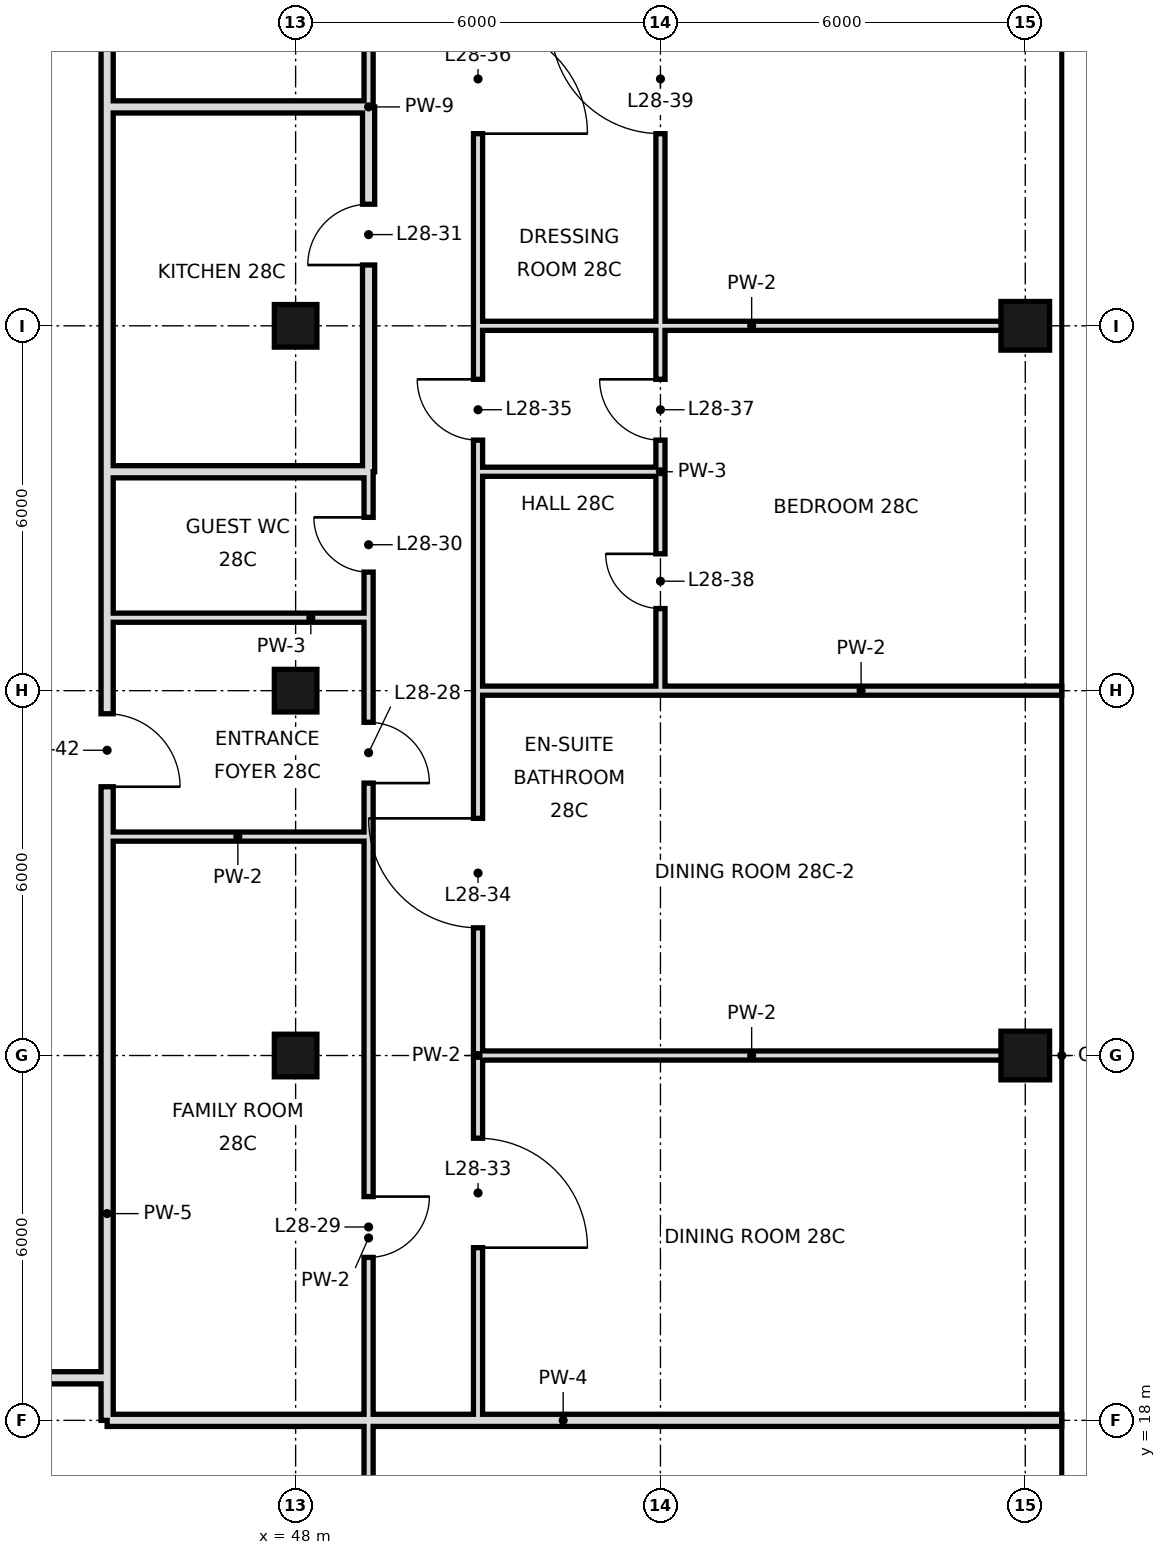
"""IFC4 building model, lengths in metres.
Left out: names, types, materials, properties, quantities, classifications, styles, units other than length and angle.
Written with IfcOpenShell. Run it as: python <this file> out.ifc"""

import sys

from ifc_helpers import new_model, si_unit, direction, frame, frame_2d, origin, origin_2d, place, context, subcontext, project, spatial, rectangle, hollow_rectangle, extrude, element, fill, save


model = new_model("IFC4")
c1 = context("Model", 3, precision=1e-05, world=origin(), true_north=direction((0.0, 1.0)))
c2 = subcontext(c1, "Body", "Model", "MODEL_VIEW")
j1 = project(units=[si_unit("LENGTHUNIT", "METRE"), si_unit("PLANEANGLEUNIT", "RADIAN")], contexts=[c1])
p1 = place(None, origin())
s1 = spatial("IfcSite", under=j1, at=p1, CompositionType="ELEMENT")
p2 = place(p1, origin())
s2 = spatial("IfcBuilding", under=s1, at=p2, CompositionType="ELEMENT")
p3 = place(p2, frame((0.0, 0.0, 126.8)))
s3 = spatial("IfcBuildingStorey", under=s2, at=p3, CompositionType="ELEMENT", Elevation=126.8)
for number, where, z_axis, x_axis in (
    (1, (48.0, 24.0, 0.0), (0.0, 0.0, 1.0), (1.0, 0.0, 0.0)),
    (2, (48.0, 30.0, 0.0), (0.0, 0.0, 1.0), (1.0, 0.0, 0.0)),
    (3, (48.0, 36.0, 0.0), (0.0, 0.0, 1.0), (1.0, 0.0, 0.0)),
):
    element("IfcColumn", number, at=place(p3, frame(where, z_axis=z_axis, x_axis=x_axis)), inside=s3, PredefinedType="COLUMN", context=c2, shape_type="SweptSolid", body=[
        extrude(hollow_rectangle(XDim=0.7, YDim=0.7, WallThickness=0.036, at=origin_2d()), origin(), (0.0, 0.0, 1.0), 3.6),
    ])
for number, where, z_axis, x_axis in (
    (4, (60.0, 24.0, 0.0), (0.0, 0.0, 1.0), (1.0, 0.0, 0.0)),
    (5, (60.0, 36.0, 0.0), (0.0, 0.0, 1.0), (1.0, 0.0, 0.0)),
):
    element("IfcColumn", number, at=place(p3, frame(where, z_axis=z_axis, x_axis=x_axis)), inside=s3, PredefinedType="COLUMN", context=c2, shape_type="SweptSolid", body=[
        extrude(hollow_rectangle(XDim=0.8, YDim=0.8, WallThickness=0.04, at=origin_2d()), origin(), (0.0, 0.0, 1.0), 3.6),
    ])
p4 = place(p3, frame((44.9, 18.7, 0.0), z_axis=(0.0, 0.0, 1.0), x_axis=(0.0, 1.0, 0.0)))
e6 = element("IfcWall", 6, at=p4, inside=s3, PredefinedType="SOLIDWALL", context=c2, shape_type="SweptSolid", body=[
    extrude(rectangle(XDim=14.9, YDim=0.2, at=frame_2d((7.45, 0.0))), origin(), (0.0, 0.0, 1.0), 2.97),
])
p5 = place(p4, frame((9.72, 0.0, 0.0)))
e7 = element("IfcOpeningElement", 7, at=p5, cuts=e6, PredefinedType="OPENING", context=c2, shape_type="SweptSolid", body=[
    extrude(rectangle(XDim=1.2, YDim=2.4, at=frame_2d((0.6, 1.2))), frame((0.0, 0.11, 0.0), z_axis=(0.0, -1.0, 0.0), x_axis=(1.0, 0.0, 0.0)), (0.0, 0.0, 1.0), 0.22),
])
p6 = place(p3, frame((44.9, 39.6, 0.0), z_axis=(0.0, 0.0, 1.0), x_axis=(0.0, 1.0, 0.0)))
e8 = element("IfcWall", 8, at=p6, inside=s3, PredefinedType="SOLIDWALL", context=c2, shape_type="SweptSolid", body=[
    extrude(rectangle(XDim=9.0, YDim=0.2, at=frame_2d((4.5, 0.0))), origin(), (0.0, 0.0, 1.0), 2.72),
])
p7 = place(p3, frame((44.9, 33.6, 0.0), z_axis=(0.0, 0.0, 1.0), x_axis=(0.0, 1.0, 0.0)))
e9 = element("IfcWall", 9, at=p7, inside=s3, PredefinedType="SOLIDWALL", context=c2, shape_type="SweptSolid", body=[
    extrude(rectangle(XDim=6.0, YDim=0.2, at=frame_2d((3.0, 0.0))), origin(), (0.0, 0.0, 1.0), 3.42),
])
p8 = place(p3, frame((44.9, 18.0, 0.0), z_axis=(0.0, 0.0, 1.0), x_axis=(0.0, 1.0, 0.0)))
e10 = element("IfcWall", 10, at=p8, inside=s3, PredefinedType="SOLIDWALL", context=c2, shape_type="SweptSolid", body=[
    extrude(rectangle(XDim=0.7, YDim=0.2, at=frame_2d((0.35, 0.0))), origin(), (0.0, 0.0, 1.0), 2.97),
])
p9 = place(p3, frame((49.2, 33.6, 0.0), z_axis=(0.0, 0.0, 1.0), x_axis=(0.0, 1.0, 0.0)))
e11 = element("IfcWall", 11, at=p9, inside=s3, PredefinedType="SOLIDWALL", context=c2, shape_type="SweptSolid", body=[
    extrude(rectangle(XDim=6.0, YDim=0.2, at=frame_2d((3.0, 0.0))), origin(), (0.0, 0.0, 1.0), 2.72),
])
p10 = place(p9, frame((3.4, 0.0, 0.0)))
e12 = element("IfcOpeningElement", 12, at=p10, cuts=e11, PredefinedType="OPENING", context=c2, shape_type="SweptSolid", body=[
    extrude(rectangle(XDim=1.0, YDim=2.4, at=frame_2d((0.5, 1.2))), frame((0.0, 0.11, 0.0), z_axis=(0.0, -1.0, 0.0), x_axis=(1.0, 0.0, 0.0)), (0.0, 0.0, 1.0), 0.22),
])
p11 = place(p3, frame((49.2, 10.8, 0.0), z_axis=(0.0, 0.0, 1.0), x_axis=(0.0, 1.0, 0.0)))
e13 = element("IfcWall", 13, at=p11, inside=s3, PredefinedType="PARTITIONING", context=c2, shape_type="SweptSolid", body=[
    extrude(rectangle(XDim=20.4, YDim=0.15, at=frame_2d((10.2, 0.0))), origin(), (0.0, 0.0, 1.0), 3.42),
])
p12 = place(p11, frame((17.68, 0.0, 0.0)))
e14 = element("IfcOpeningElement", 14, at=p12, cuts=e13, PredefinedType="OPENING", context=c2, shape_type="SweptSolid", body=[
    extrude(rectangle(XDim=1.0, YDim=2.4, at=frame_2d((0.5, 1.2))), frame((0.0, 0.085, 0.0), z_axis=(0.0, -1.0, 0.0), x_axis=(1.0, 0.0, 0.0)), (0.0, 0.0, 1.0), 0.17),
])
p13 = place(p11, frame((9.88, 0.0, 0.0)))
e15 = element("IfcOpeningElement", 15, at=p13, cuts=e13, PredefinedType="OPENING", context=c2, shape_type="SweptSolid", body=[
    extrude(rectangle(XDim=1.0, YDim=2.4, at=frame_2d((0.5, 1.2))), frame((0.0, 0.085, 0.0), z_axis=(0.0, -1.0, 0.0), x_axis=(1.0, 0.0, 0.0)), (0.0, 0.0, 1.0), 0.17),
])
p14 = place(p3, frame((49.2, 39.6, 0.0), z_axis=(0.0, 0.0, 1.0), x_axis=(0.0, 1.0, 0.0)))
e16 = element("IfcWall", 16, at=p14, inside=s3, PredefinedType="PARTITIONING", context=c2, shape_type="SweptSolid", body=[
    extrude(rectangle(XDim=9.0, YDim=0.15, at=frame_2d((4.5, 0.0))), origin(), (0.0, 0.0, 1.0), 3.42),
])
p15 = place(p14, frame((3.7, 0.0, 0.0)))
e17 = element("IfcOpeningElement", 17, at=p15, cuts=e16, PredefinedType="OPENING", context=c2, shape_type="SweptSolid", body=[
    extrude(rectangle(XDim=1.0, YDim=2.4, at=frame_2d((0.5, 1.2))), frame((0.0, 0.085, 0.0), z_axis=(0.0, -1.0, 0.0), x_axis=(1.0, 0.0, 0.0)), (0.0, 0.0, 1.0), 0.17),
])
p16 = place(p3, frame((49.2, 31.2, 0.0), z_axis=(0.0, 0.0, 1.0), x_axis=(0.0, 1.0, 0.0)))
e18 = element("IfcWall", 18, at=p16, inside=s3, PredefinedType="PARTITIONING", context=c2, shape_type="SweptSolid", body=[
    extrude(rectangle(XDim=2.4, YDim=0.15, at=frame_2d((1.2, 0.0))), origin(), (0.0, 0.0, 1.0), 3.42),
])
p17 = place(p16, frame((0.75, 0.0, 0.0)))
e19 = element("IfcOpeningElement", 19, at=p17, cuts=e18, PredefinedType="OPENING", context=c2, shape_type="SweptSolid", body=[
    extrude(rectangle(XDim=0.9, YDim=2.4, at=frame_2d((0.45, 1.2))), frame((0.0, 0.085, 0.0), z_axis=(0.0, -1.0, 0.0), x_axis=(1.0, 0.0, 0.0)), (0.0, 0.0, 1.0), 0.17),
])
p18 = place(p3, frame((51.0, 18.0, 0.0), z_axis=(0.0, 0.0, 1.0), x_axis=(0.0, 1.0, 0.0)))
e20 = element("IfcWall", 20, at=p18, inside=s3, PredefinedType="PARTITIONING", context=c2, shape_type="SweptSolid", body=[
    extrude(rectangle(XDim=12.0, YDim=0.15, at=frame_2d((6.0, 0.0))), origin(), (0.0, 0.0, 1.0), 3.42),
])
p19 = place(p18, frame((2.84, 0.0, 0.0)))
e21 = element("IfcOpeningElement", 21, at=p19, cuts=e20, PredefinedType="OPENING", context=c2, shape_type="SweptSolid", body=[
    extrude(rectangle(XDim=1.8, YDim=2.4, at=frame_2d((0.9, 1.2))), frame((0.0, 0.085, 0.0), z_axis=(0.0, -1.0, 0.0), x_axis=(1.0, 0.0, 0.0)), (0.0, 0.0, 1.0), 0.17),
])
p20 = place(p18, frame((8.1, 0.0, 0.0)))
e22 = element("IfcOpeningElement", 22, at=p20, cuts=e20, PredefinedType="OPENING", context=c2, shape_type="SweptSolid", body=[
    extrude(rectangle(XDim=1.8, YDim=2.4, at=frame_2d((0.9, 1.2))), frame((0.0, 0.085, 0.0), z_axis=(0.0, -1.0, 0.0), x_axis=(1.0, 0.0, 0.0)), (0.0, 0.0, 1.0), 0.17),
])
p21 = place(p3, frame((51.0, 33.6, 0.0), z_axis=(0.0, 0.0, 1.0), x_axis=(0.0, 1.0, 0.0)))
e23 = element("IfcWall", 23, at=p21, inside=s3, PredefinedType="PARTITIONING", context=c2, shape_type="SweptSolid", body=[
    extrude(rectangle(XDim=15.0, YDim=0.15, at=frame_2d((7.5, 0.0))), origin(), (0.0, 0.0, 1.0), 3.42),
])
p22 = place(p21, frame((0.52, 0.0, 0.0)))
e24 = element("IfcOpeningElement", 24, at=p22, cuts=e23, PredefinedType="OPENING", context=c2, shape_type="SweptSolid", body=[
    extrude(rectangle(XDim=1.0, YDim=2.4, at=frame_2d((0.5, 1.2))), frame((0.0, 0.085, 0.0), z_axis=(0.0, -1.0, 0.0), x_axis=(1.0, 0.0, 0.0)), (0.0, 0.0, 1.0), 0.17),
])
p23 = place(p21, frame((5.56, 0.0, 0.0)))
e25 = element("IfcOpeningElement", 25, at=p23, cuts=e23, PredefinedType="OPENING", context=c2, shape_type="SweptSolid", body=[
    extrude(rectangle(XDim=1.8, YDim=2.4, at=frame_2d((0.9, 1.2))), frame((0.0, 0.085, 0.0), z_axis=(0.0, -1.0, 0.0), x_axis=(1.0, 0.0, 0.0)), (0.0, 0.0, 1.0), 0.17),
])
p24 = place(p3, frame((51.0, 30.0, 0.0), z_axis=(0.0, 0.0, 1.0), x_axis=(0.0, 1.0, 0.0)))
e26 = element("IfcWall", 26, at=p24, inside=s3, PredefinedType="PARTITIONING", context=c2, shape_type="SweptSolid", body=[
    extrude(rectangle(XDim=3.6, YDim=0.15, at=frame_2d((1.8, 0.0))), origin(), (0.0, 0.0, 1.0), 3.42),
])
p25 = place(p3, frame((54.0, 33.6, 0.0), z_axis=(0.0, 0.0, 1.0), x_axis=(0.0, 1.0, 0.0)))
e27 = element("IfcWall", 27, at=p25, inside=s3, PredefinedType="PARTITIONING", context=c2, shape_type="SweptSolid", body=[
    extrude(rectangle(XDim=14.4, YDim=0.15, at=frame_2d((7.2, 0.0))), origin(), (0.0, 0.0, 1.0), 3.42),
])
p26 = place(p25, frame((0.52, 0.0, 0.0)))
e28 = element("IfcOpeningElement", 28, at=p26, cuts=e27, PredefinedType="OPENING", context=c2, shape_type="SweptSolid", body=[
    extrude(rectangle(XDim=1.0, YDim=2.4, at=frame_2d((0.5, 1.2))), frame((0.0, 0.085, 0.0), z_axis=(0.0, -1.0, 0.0), x_axis=(1.0, 0.0, 0.0)), (0.0, 0.0, 1.0), 0.17),
])
p27 = place(p25, frame((5.56, 0.0, 0.0)))
e29 = element("IfcOpeningElement", 29, at=p27, cuts=e27, PredefinedType="OPENING", context=c2, shape_type="SweptSolid", body=[
    extrude(rectangle(XDim=1.8, YDim=2.4, at=frame_2d((0.9, 1.2))), frame((0.0, 0.085, 0.0), z_axis=(0.0, -1.0, 0.0), x_axis=(1.0, 0.0, 0.0)), (0.0, 0.0, 1.0), 0.17),
])
p28 = place(p3, frame((54.0, 30.0, 0.0), z_axis=(0.0, 0.0, 1.0), x_axis=(0.0, 1.0, 0.0)))
e30 = element("IfcWall", 30, at=p28, inside=s3, PredefinedType="PARTITIONING", context=c2, shape_type="SweptSolid", body=[
    extrude(rectangle(XDim=3.6, YDim=0.15, at=frame_2d((1.8, 0.0))), origin(), (0.0, 0.0, 1.0), 3.42),
])
p29 = place(p28, frame((1.35, 0.0, 0.0)))
e31 = element("IfcOpeningElement", 31, at=p29, cuts=e30, PredefinedType="OPENING", context=c2, shape_type="SweptSolid", body=[
    extrude(rectangle(XDim=0.9, YDim=2.4, at=frame_2d((0.45, 1.2))), frame((0.0, 0.085, 0.0), z_axis=(0.0, -1.0, 0.0), x_axis=(1.0, 0.0, 0.0)), (0.0, 0.0, 1.0), 0.17),
])
p30 = place(p3, frame((44.9, 18.0, 0.0), z_axis=(0.0, 0.0, 1.0), x_axis=(1.0, 0.0, 0.0)))
e32 = element("IfcWall", 32, at=p30, inside=s3, PredefinedType="SOLIDWALL", context=c2, shape_type="SweptSolid", body=[
    extrude(rectangle(XDim=15.7, YDim=0.2, at=frame_2d((7.85, 0.0))), origin(), (0.0, 0.0, 1.0), 2.72),
])
p31 = place(p3, frame((35.4, 18.7, 0.0), z_axis=(0.0, 0.0, 1.0), x_axis=(1.0, 0.0, 0.0)))
e33 = element("IfcWall", 33, at=p31, inside=s3, PredefinedType="SOLIDWALL", context=c2, shape_type="SweptSolid", body=[
    extrude(rectangle(XDim=9.5, YDim=0.2, at=frame_2d((4.75, 0.0))), origin(), (0.0, 0.0, 1.0), 2.72),
])
p32 = place(p3, frame((51.0, 24.0, 0.0), z_axis=(0.0, 0.0, 1.0), x_axis=(1.0, 0.0, 0.0)))
e34 = element("IfcWall", 34, at=p32, inside=s3, PredefinedType="PARTITIONING", context=c2, shape_type="SweptSolid", body=[
    extrude(rectangle(XDim=9.0, YDim=0.15, at=frame_2d((4.5, 0.0))), origin(), (0.0, 0.0, 1.0), 2.72),
])
p33 = place(p3, frame((44.9, 27.6, 0.0), z_axis=(0.0, 0.0, 1.0), x_axis=(1.0, 0.0, 0.0)))
e35 = element("IfcWall", 35, at=p33, inside=s3, PredefinedType="PARTITIONING", context=c2, shape_type="SweptSolid", body=[
    extrude(rectangle(XDim=4.3, YDim=0.15, at=frame_2d((2.15, 0.0))), origin(), (0.0, 0.0, 1.0), 3.42),
])
p34 = place(p3, frame((54.0, 30.0, 0.0), z_axis=(0.0, 0.0, 1.0), x_axis=(1.0, 0.0, 0.0)))
e36 = element("IfcWall", 36, at=p34, inside=s3, PredefinedType="PARTITIONING", context=c2, shape_type="SweptSolid", body=[
    extrude(rectangle(XDim=6.6, YDim=0.15, at=frame_2d((3.3, 0.0))), origin(), (0.0, 0.0, 1.0), 2.72),
])
p35 = place(p3, frame((51.0, 30.0, 0.0), z_axis=(0.0, 0.0, 1.0), x_axis=(1.0, 0.0, 0.0)))
e37 = element("IfcWall", 37, at=p35, inside=s3, PredefinedType="PARTITIONING", context=c2, shape_type="SweptSolid", body=[
    extrude(rectangle(XDim=3.0, YDim=0.15, at=frame_2d((1.5, 0.0))), origin(), (0.0, 0.0, 1.0), 2.72),
])
p36 = place(p3, frame((44.9, 31.2, 0.0), z_axis=(0.0, 0.0, 1.0), x_axis=(1.0, 0.0, 0.0)))
e38 = element("IfcWall", 38, at=p36, inside=s3, PredefinedType="PARTITIONING", context=c2, shape_type="SweptSolid", body=[
    extrude(rectangle(XDim=4.3, YDim=0.15, at=frame_2d((2.15, 0.0))), origin(), (0.0, 0.0, 1.0), 3.42),
])
p37 = place(p3, frame((44.9, 33.6, 0.0), z_axis=(0.0, 0.0, 1.0), x_axis=(1.0, 0.0, 0.0)))
e39 = element("IfcWall", 39, at=p37, inside=s3, PredefinedType="SOLIDWALL", context=c2, shape_type="SweptSolid", body=[
    extrude(rectangle(XDim=4.3, YDim=0.2, at=frame_2d((2.15, 0.0))), origin(), (0.0, 0.0, 1.0), 2.97),
])
p38 = place(p3, frame((51.0, 33.6, 0.0), z_axis=(0.0, 0.0, 1.0), x_axis=(1.0, 0.0, 0.0)))
e40 = element("IfcWall", 40, at=p38, inside=s3, PredefinedType="PARTITIONING", context=c2, shape_type="SweptSolid", body=[
    extrude(rectangle(XDim=3.0, YDim=0.15, at=frame_2d((1.5, 0.0))), origin(), (0.0, 0.0, 1.0), 3.42),
])
p39 = place(p3, frame((51.0, 36.0, 0.0), z_axis=(0.0, 0.0, 1.0), x_axis=(1.0, 0.0, 0.0)))
e41 = element("IfcWall", 41, at=p39, inside=s3, PredefinedType="PARTITIONING", context=c2, shape_type="SweptSolid", body=[
    extrude(rectangle(XDim=9.0, YDim=0.15, at=frame_2d((4.5, 0.0))), origin(), (0.0, 0.0, 1.0), 2.72),
])
p40 = place(p3, frame((44.9, 39.6, 0.0), z_axis=(0.0, 0.0, 1.0), x_axis=(1.0, 0.0, 0.0)))
e42 = element("IfcWall", 42, at=p40, inside=s3, PredefinedType="SOLIDWALL", context=c2, shape_type="SweptSolid", body=[
    extrude(rectangle(XDim=4.3, YDim=0.2, at=frame_2d((2.15, 0.0))), origin(), (0.0, 0.0, 1.0), 2.97),
])
p41 = place(p12, frame((1.0, 0.0, 0.0), z_axis=(0.0, 0.0, 1.0), x_axis=(-1.0, 0.0, 0.0)))
e43 = element("IfcDoor", 43, at=p41, inside=s3, OperationType="SINGLE_SWING_RIGHT", PredefinedType="DOOR", context=c2, shape_type="SweptSolid", body=[
    extrude(rectangle(XDim=1.0, YDim=2.4, at=frame_2d((0.5, 1.2))), frame((0.0, 0.025, 0.0), z_axis=(0.0, -1.0, 0.0), x_axis=(1.0, 0.0, 0.0)), (0.0, 0.0, 1.0), 0.05),
])
fill(e14, e43)
p42 = place(p13, origin())
e44 = element("IfcDoor", 44, at=p42, inside=s3, OperationType="SINGLE_SWING_RIGHT", PredefinedType="DOOR", context=c2, shape_type="SweptSolid", body=[
    extrude(rectangle(XDim=1.0, YDim=2.4, at=frame_2d((0.5, 1.2))), frame((0.0, 0.025, 0.0), z_axis=(0.0, -1.0, 0.0), x_axis=(1.0, 0.0, 0.0)), (0.0, 0.0, 1.0), 0.05),
])
fill(e15, e44)
p43 = place(p17, frame((0.9, 0.0, 0.0), z_axis=(0.0, 0.0, 1.0), x_axis=(-1.0, 0.0, 0.0)))
e45 = element("IfcDoor", 45, at=p43, inside=s3, OperationType="SINGLE_SWING_LEFT", PredefinedType="DOOR", context=c2, shape_type="SweptSolid", body=[
    extrude(rectangle(XDim=0.9, YDim=2.4, at=frame_2d((0.45, 1.2))), frame((0.0, 0.025, 0.0), z_axis=(0.0, -1.0, 0.0), x_axis=(1.0, 0.0, 0.0)), (0.0, 0.0, 1.0), 0.05),
])
fill(e19, e45)
p44 = place(p10, origin())
e46 = element("IfcDoor", 46, at=p44, inside=s3, OperationType="SINGLE_SWING_LEFT", PredefinedType="DOOR", context=c2, shape_type="SweptSolid", body=[
    extrude(rectangle(XDim=1.0, YDim=2.4, at=frame_2d((0.5, 1.2))), frame((0.0, 0.025, 0.0), z_axis=(0.0, -1.0, 0.0), x_axis=(1.0, 0.0, 0.0)), (0.0, 0.0, 1.0), 0.05),
])
fill(e12, e46)
p45 = place(p19, frame((1.8, 0.0, 0.0), z_axis=(0.0, 0.0, 1.0), x_axis=(-1.0, 0.0, 0.0)))
e47 = element("IfcDoor", 47, at=p45, inside=s3, OperationType="SINGLE_SWING_RIGHT", PredefinedType="DOOR", context=c2, shape_type="SweptSolid", body=[
    extrude(rectangle(XDim=1.8, YDim=2.4, at=frame_2d((0.9, 1.2))), frame((0.0, 0.025, 0.0), z_axis=(0.0, -1.0, 0.0), x_axis=(1.0, 0.0, 0.0)), (0.0, 0.0, 1.0), 0.05),
])
fill(e21, e47)
p46 = place(p20, frame((1.8, 0.0, 0.0), z_axis=(0.0, 0.0, 1.0), x_axis=(-1.0, 0.0, 0.0)))
e48 = element("IfcDoor", 48, at=p46, inside=s3, OperationType="SINGLE_SWING_LEFT", PredefinedType="DOOR", context=c2, shape_type="SweptSolid", body=[
    extrude(rectangle(XDim=1.8, YDim=2.4, at=frame_2d((0.9, 1.2))), frame((0.0, 0.025, 0.0), z_axis=(0.0, -1.0, 0.0), x_axis=(1.0, 0.0, 0.0)), (0.0, 0.0, 1.0), 0.05),
])
fill(e22, e48)
p47 = place(p22, frame((1.0, 0.0, 0.0), z_axis=(0.0, 0.0, 1.0), x_axis=(-1.0, 0.0, 0.0)))
e49 = element("IfcDoor", 49, at=p47, inside=s3, OperationType="SINGLE_SWING_LEFT", PredefinedType="DOOR", context=c2, shape_type="SweptSolid", body=[
    extrude(rectangle(XDim=1.0, YDim=2.4, at=frame_2d((0.5, 1.2))), frame((0.0, 0.025, 0.0), z_axis=(0.0, -1.0, 0.0), x_axis=(1.0, 0.0, 0.0)), (0.0, 0.0, 1.0), 0.05),
])
fill(e24, e49)
p48 = place(p23, frame((1.8, 0.0, 0.0), z_axis=(0.0, 0.0, 1.0), x_axis=(-1.0, 0.0, 0.0)))
e50 = element("IfcDoor", 50, at=p48, inside=s3, OperationType="SINGLE_SWING_RIGHT", PredefinedType="DOOR", context=c2, shape_type="SweptSolid", body=[
    extrude(rectangle(XDim=1.8, YDim=2.4, at=frame_2d((0.9, 1.2))), frame((0.0, 0.025, 0.0), z_axis=(0.0, -1.0, 0.0), x_axis=(1.0, 0.0, 0.0)), (0.0, 0.0, 1.0), 0.05),
])
fill(e25, e50)
p49 = place(p26, frame((1.0, 0.0, 0.0), z_axis=(0.0, 0.0, 1.0), x_axis=(-1.0, 0.0, 0.0)))
e51 = element("IfcDoor", 51, at=p49, inside=s3, OperationType="SINGLE_SWING_LEFT", PredefinedType="DOOR", context=c2, shape_type="SweptSolid", body=[
    extrude(rectangle(XDim=1.0, YDim=2.4, at=frame_2d((0.5, 1.2))), frame((0.0, 0.025, 0.0), z_axis=(0.0, -1.0, 0.0), x_axis=(1.0, 0.0, 0.0)), (0.0, 0.0, 1.0), 0.05),
])
fill(e28, e51)
p50 = place(p29, frame((0.9, 0.0, 0.0), z_axis=(0.0, 0.0, 1.0), x_axis=(-1.0, 0.0, 0.0)))
e52 = element("IfcDoor", 52, at=p50, inside=s3, OperationType="SINGLE_SWING_LEFT", PredefinedType="DOOR", context=c2, shape_type="SweptSolid", body=[
    extrude(rectangle(XDim=0.9, YDim=2.4, at=frame_2d((0.45, 1.2))), frame((0.0, 0.025, 0.0), z_axis=(0.0, -1.0, 0.0), x_axis=(1.0, 0.0, 0.0)), (0.0, 0.0, 1.0), 0.05),
])
fill(e31, e52)
p51 = place(p27, frame((1.8, 0.0, 0.0), z_axis=(0.0, 0.0, 1.0), x_axis=(-1.0, 0.0, 0.0)))
e53 = element("IfcDoor", 53, at=p51, inside=s3, OperationType="SINGLE_SWING_LEFT", PredefinedType="DOOR", context=c2, shape_type="SweptSolid", body=[
    extrude(rectangle(XDim=1.8, YDim=2.4, at=frame_2d((0.9, 1.2))), frame((0.0, 0.025, 0.0), z_axis=(0.0, -1.0, 0.0), x_axis=(1.0, 0.0, 0.0)), (0.0, 0.0, 1.0), 0.05),
])
fill(e29, e53)
p52 = place(p5, frame((1.2, 0.0, 0.0), z_axis=(0.0, 0.0, 1.0), x_axis=(-1.0, 0.0, 0.0)))
e54 = element("IfcDoor", 54, at=p52, inside=s3, OperationType="SINGLE_SWING_RIGHT", PredefinedType="DOOR", context=c2, shape_type="SweptSolid", body=[
    extrude(rectangle(XDim=1.2, YDim=2.4, at=frame_2d((0.6, 1.2))), frame((0.0, 0.025, 0.0), z_axis=(0.0, -1.0, 0.0), x_axis=(1.0, 0.0, 0.0)), (0.0, 0.0, 1.0), 0.05),
])
fill(e7, e54)
save(model, sys.argv[1])
